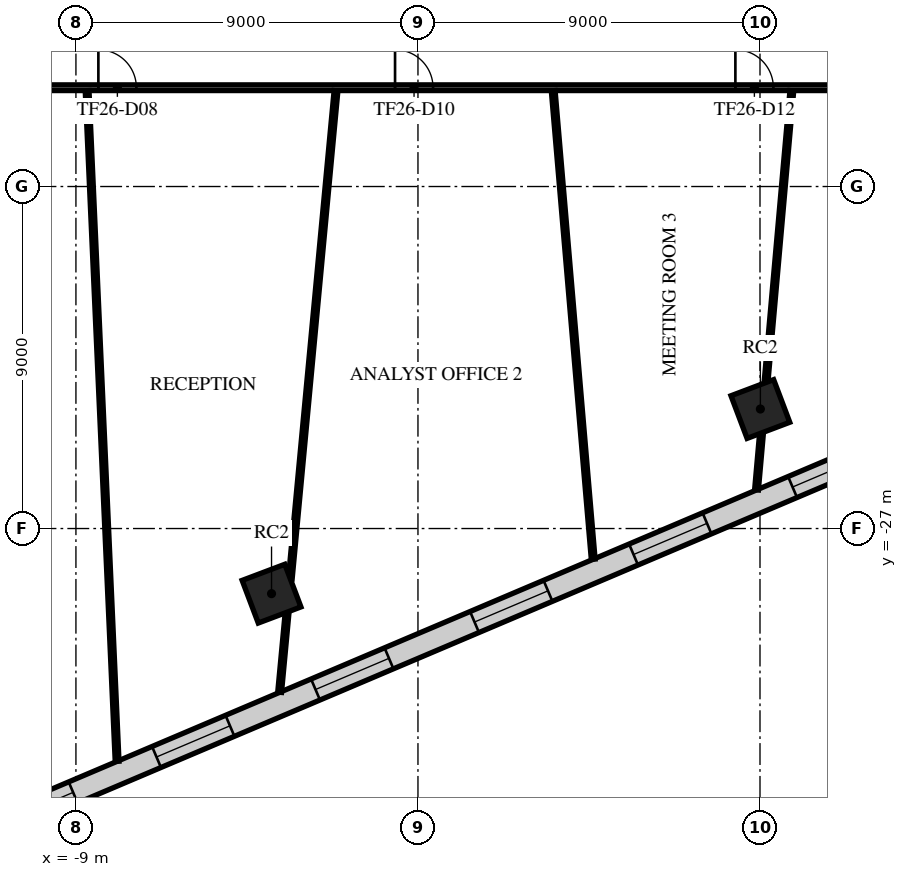
"""IFC4 building model, lengths in metres.
Left out: names, types, materials, properties, quantities, classifications, styles, units other than length and angle.
Written with IfcOpenShell. Run it as: python <this file> out.ifc"""

import sys

from ifc_helpers import new_model, si_unit, direction, frame, frame_2d, origin, origin_2d, place, context, subcontext, project, spatial, rectangle, extrude, element, fill, save


model = new_model("IFC4")
c1 = context("Model", 3, precision=1e-05, world=origin(), true_north=direction((0.0, 1.0)))
c2 = subcontext(c1, "Body", "Model", "MODEL_VIEW")
j1 = project(units=[si_unit("LENGTHUNIT", "METRE"), si_unit("PLANEANGLEUNIT", "RADIAN")], contexts=[c1])
p1 = place(None, origin())
s1 = spatial("IfcSite", under=j1, at=p1, CompositionType="ELEMENT")
p2 = place(p1, origin())
s2 = spatial("IfcBuilding", under=s1, at=p2, CompositionType="ELEMENT")
p3 = place(p2, frame((0.0, 0.0, 114.1)))
s3 = spatial("IfcBuildingStorey", under=s2, at=p3, CompositionType="ELEMENT", Elevation=114.1)
for number, where, z_axis, x_axis in (
    (1, (-3.853, -28.714, 0.0), (0.0, 0.0, 1.0), (0.935, 0.353, 0.0)),
    (2, (9.01, -23.855, 0.0), (0.0, 0.0, 1.0), (0.935, 0.353, 0.0)),
):
    element("IfcColumn", number, at=place(p3, frame(where, z_axis=z_axis, x_axis=x_axis)), inside=s3, PredefinedType="COLUMN", context=c2, shape_type="SweptSolid", body=[
        extrude(rectangle(XDim=1.2, YDim=1.2, at=origin_2d()), origin(), (0.0, 0.0, 1.0), 4.0),
    ])
p4 = place(p3, frame((-12.075, -35.218, 0.0), z_axis=(0.0, 0.0, 1.0), x_axis=(0.920504562186, 0.39073181467, 0.0)))
e3 = element("IfcWall", 3, at=p4, inside=s3, PredefinedType="STANDARD", context=c2, shape_type="SweptSolid", body=[
    extrude(rectangle(XDim=49.751, YDim=0.6, at=frame_2d((24.876, 0.0))), origin(), (0.0, 0.0, 1.0), 3.58),
])
p5 = place(p4, frame((1.161, 0.0, 0.9)))
e4 = element("IfcOpeningElement", 4, at=p5, cuts=e3, PredefinedType="OPENING", context=c2, shape_type="SweptSolid", body=[
    extrude(rectangle(XDim=2.1, YDim=2.1, at=frame_2d((1.05, 1.05))), frame((0.0, 0.31, 0.0), z_axis=(0.0, -1.0, 0.0), x_axis=(1.0, 0.0, 0.0)), (0.0, 0.0, 1.0), 0.62),
])
p6 = place(p4, frame((5.644, 0.0, 0.9)))
e5 = element("IfcOpeningElement", 5, at=p6, cuts=e3, PredefinedType="OPENING", context=c2, shape_type="SweptSolid", body=[
    extrude(rectangle(XDim=2.1, YDim=2.1, at=frame_2d((1.05, 1.05))), frame((0.0, 0.31, 0.0), z_axis=(0.0, -1.0, 0.0), x_axis=(1.0, 0.0, 0.0)), (0.0, 0.0, 1.0), 0.62),
])
p7 = place(p4, frame((10.189, 0.0, 0.9)))
e6 = element("IfcOpeningElement", 6, at=p7, cuts=e3, PredefinedType="OPENING", context=c2, shape_type="SweptSolid", body=[
    extrude(rectangle(XDim=2.1, YDim=2.1, at=frame_2d((1.05, 1.05))), frame((0.0, 0.31, 0.0), z_axis=(0.0, -1.0, 0.0), x_axis=(1.0, 0.0, 0.0)), (0.0, 0.0, 1.0), 0.62),
])
p8 = place(p4, frame((14.735, 0.0, 0.9)))
e7 = element("IfcOpeningElement", 7, at=p8, cuts=e3, PredefinedType="OPENING", context=c2, shape_type="SweptSolid", body=[
    extrude(rectangle(XDim=2.1, YDim=2.1, at=frame_2d((1.05, 1.05))), frame((0.0, 0.31, 0.0), z_axis=(0.0, -1.0, 0.0), x_axis=(1.0, 0.0, 0.0)), (0.0, 0.0, 1.0), 0.62),
])
p9 = place(p4, frame((19.28, 0.0, 0.9)))
e8 = element("IfcOpeningElement", 8, at=p9, cuts=e3, PredefinedType="OPENING", context=c2, shape_type="SweptSolid", body=[
    extrude(rectangle(XDim=2.1, YDim=2.1, at=frame_2d((1.05, 1.05))), frame((0.0, 0.31, 0.0), z_axis=(0.0, -1.0, 0.0), x_axis=(1.0, 0.0, 0.0)), (0.0, 0.0, 1.0), 0.62),
])
p10 = place(p4, frame((23.826, 0.0, 0.9)))
e9 = element("IfcOpeningElement", 9, at=p10, cuts=e3, PredefinedType="OPENING", context=c2, shape_type="SweptSolid", body=[
    extrude(rectangle(XDim=2.1, YDim=2.1, at=frame_2d((1.05, 1.05))), frame((0.0, 0.31, 0.0), z_axis=(0.0, -1.0, 0.0), x_axis=(1.0, 0.0, 0.0)), (0.0, 0.0, 1.0), 0.62),
])
p11 = place(p4, frame((28.371, 0.0, 0.9)))
e10 = element("IfcOpeningElement", 10, at=p11, cuts=e3, PredefinedType="OPENING", context=c2, shape_type="SweptSolid", body=[
    extrude(rectangle(XDim=2.1, YDim=2.1, at=frame_2d((1.05, 1.05))), frame((0.0, 0.31, 0.0), z_axis=(0.0, -1.0, 0.0), x_axis=(1.0, 0.0, 0.0)), (0.0, 0.0, 1.0), 0.62),
])
p12 = place(p4, frame((32.917, 0.0, 0.9)))
e11 = element("IfcOpeningElement", 11, at=p12, cuts=e3, PredefinedType="OPENING", context=c2, shape_type="SweptSolid", body=[
    extrude(rectangle(XDim=2.1, YDim=2.1, at=frame_2d((1.05, 1.05))), frame((0.0, 0.31, 0.0), z_axis=(0.0, -1.0, 0.0), x_axis=(1.0, 0.0, 0.0)), (0.0, 0.0, 1.0), 0.62),
])
p13 = place(p4, frame((37.462, 0.0, 0.9)))
e12 = element("IfcOpeningElement", 12, at=p13, cuts=e3, PredefinedType="OPENING", context=c2, shape_type="SweptSolid", body=[
    extrude(rectangle(XDim=2.1, YDim=2.1, at=frame_2d((1.05, 1.05))), frame((0.0, 0.31, 0.0), z_axis=(0.0, -1.0, 0.0), x_axis=(1.0, 0.0, 0.0)), (0.0, 0.0, 1.0), 0.62),
])
p14 = place(p4, frame((42.008, 0.0, 0.9)))
e13 = element("IfcOpeningElement", 13, at=p14, cuts=e3, PredefinedType="OPENING", context=c2, shape_type="SweptSolid", body=[
    extrude(rectangle(XDim=2.1, YDim=2.1, at=frame_2d((1.05, 1.05))), frame((0.0, 0.31, 0.0), z_axis=(0.0, -1.0, 0.0), x_axis=(1.0, 0.0, 0.0)), (0.0, 0.0, 1.0), 0.62),
])
p15 = place(p4, frame((46.491, 0.0, 0.9)))
e14 = element("IfcOpeningElement", 14, at=p15, cuts=e3, PredefinedType="OPENING", context=c2, shape_type="SweptSolid", body=[
    extrude(rectangle(XDim=2.1, YDim=2.1, at=frame_2d((1.05, 1.05))), frame((0.0, 0.31, 0.0), z_axis=(0.0, -1.0, 0.0), x_axis=(1.0, 0.0, 0.0)), (0.0, 0.0, 1.0), 0.62),
])
p16 = place(p3, frame((-15.325, -15.4, 0.0), z_axis=(0.0, 0.0, 1.0), x_axis=(1.0, 0.0, 0.0)))
e15 = element("IfcWall", 15, at=p16, inside=s3, PredefinedType="PARTITIONING", context=c2, shape_type="SweptSolid", body=[
    extrude(rectangle(XDim=30.725, YDim=0.15, at=frame_2d((15.362, 0.0))), origin(), (0.0, 0.0, 1.0), 3.08),
])
p17 = place(p16, frame((3.05, 0.0, 0.0)))
e16 = element("IfcOpeningElement", 16, at=p17, cuts=e15, PredefinedType="OPENING", context=c2, shape_type="SweptSolid", body=[
    extrude(rectangle(XDim=1.0, YDim=2.1, at=frame_2d((0.5, 1.05))), frame((0.0, 0.085, 0.0), z_axis=(0.0, -1.0, 0.0), x_axis=(1.0, 0.0, 0.0)), (0.0, 0.0, 1.0), 0.17),
])
p18 = place(p16, frame((6.916, 0.0, 0.0)))
e17 = element("IfcOpeningElement", 17, at=p18, cuts=e15, PredefinedType="OPENING", context=c2, shape_type="SweptSolid", body=[
    extrude(rectangle(XDim=1.0, YDim=2.1, at=frame_2d((0.5, 1.05))), frame((0.0, 0.085, 0.0), z_axis=(0.0, -1.0, 0.0), x_axis=(1.0, 0.0, 0.0)), (0.0, 0.0, 1.0), 0.17),
])
p19 = place(p16, frame((14.722, 0.0, 0.0)))
e18 = element("IfcOpeningElement", 18, at=p19, cuts=e15, PredefinedType="OPENING", context=c2, shape_type="SweptSolid", body=[
    extrude(rectangle(XDim=1.0, YDim=2.1, at=frame_2d((0.5, 1.05))), frame((0.0, 0.085, 0.0), z_axis=(0.0, -1.0, 0.0), x_axis=(1.0, 0.0, 0.0)), (0.0, 0.0, 1.0), 0.17),
])
p20 = place(p16, frame((23.677, 0.0, 0.0)))
e19 = element("IfcOpeningElement", 19, at=p20, cuts=e15, PredefinedType="OPENING", context=c2, shape_type="SweptSolid", body=[
    extrude(rectangle(XDim=1.0, YDim=2.1, at=frame_2d((0.5, 1.05))), frame((0.0, 0.085, 0.0), z_axis=(0.0, -1.0, 0.0), x_axis=(1.0, 0.0, 0.0)), (0.0, 0.0, 1.0), 0.17),
])
p21 = place(p3, frame((-8.706, -15.477, 0.0), z_axis=(0.0, 0.0, 1.0), x_axis=(0.044654718462, -0.999002480537, 0.0)))
e20 = element("IfcWall", 20, at=p21, inside=s3, PredefinedType="PARTITIONING", context=c2, shape_type="SweptSolid", body=[
    extrude(rectangle(XDim=17.665, YDim=0.1, at=frame_2d((8.833, 0.0))), origin(), (0.0, 0.0, 1.0), 2.83),
])
p22 = place(p3, frame((-3.64, -31.309, 0.0), z_axis=(0.0, 0.0, 1.0), x_axis=(0.093362131985, 0.995632217393, 0.0)))
e21 = element("IfcWall", 21, at=p22, inside=s3, PredefinedType="PARTITIONING", context=c2, shape_type="SweptSolid", body=[
    extrude(rectangle(XDim=2.118, YDim=0.1, at=frame_2d((1.059, 0.0))), origin(), (0.0, 0.0, 1.0), 3.58),
])
p23 = place(p3, frame((-3.36, -28.321, 0.0), z_axis=(0.0, 0.0, 1.0), x_axis=(0.093320771667, 0.995636094954, 0.0)))
e22 = element("IfcWall", 22, at=p23, inside=s3, PredefinedType="PARTITIONING", context=c2, shape_type="SweptSolid", body=[
    extrude(rectangle(XDim=12.898, YDim=0.1, at=frame_2d((6.449, 0.0))), origin(), (0.0, 0.0, 1.0), 2.83),
])
p24 = place(p3, frame((3.559, -15.479, 0.0), z_axis=(0.0, 0.0, 1.0), x_axis=(0.08504742067, -0.996376904709, 0.0)))
e23 = element("IfcWall", 23, at=p24, inside=s3, PredefinedType="PARTITIONING", context=c2, shape_type="SweptSolid", body=[
    extrude(rectangle(XDim=12.373, YDim=0.1, at=frame_2d((6.186, 0.0))), origin(), (0.0, 0.0, 1.0), 2.83),
])
p25 = place(p3, frame((8.908, -25.983, 0.0), z_axis=(0.0, 0.0, 1.0), x_axis=(0.088149646839, 0.996107243103, 0.0)))
e24 = element("IfcWall", 24, at=p25, inside=s3, PredefinedType="PARTITIONING", context=c2, shape_type="SweptSolid", body=[
    extrude(rectangle(XDim=1.504, YDim=0.1, at=frame_2d((0.752, 0.0))), origin(), (0.0, 0.0, 1.0), 3.58),
])
p26 = place(p3, frame((9.158, -23.158, 0.0), z_axis=(0.0, 0.0, 1.0), x_axis=(0.088176658473, 0.996104852363, 0.0)))
e25 = element("IfcWall", 25, at=p26, inside=s3, PredefinedType="PARTITIONING", context=c2, shape_type="SweptSolid", body=[
    extrude(rectangle(XDim=7.708, YDim=0.1, at=frame_2d((3.854, 0.0))), origin(), (0.0, 0.0, 1.0), 2.96),
])
p27 = place(p5, origin())
e26 = element("IfcWindow", 26, at=p27, inside=s3, PartitioningType="SINGLE_PANEL", PredefinedType="WINDOW", context=c2, shape_type="SweptSolid", body=[
    extrude(rectangle(XDim=2.1, YDim=2.1, at=frame_2d((1.05, 1.05))), frame((0.0, 0.03, 0.0), z_axis=(0.0, -1.0, 0.0), x_axis=(1.0, 0.0, 0.0)), (0.0, 0.0, 1.0), 0.06),
])
fill(e4, e26)
p28 = place(p6, origin())
e27 = element("IfcWindow", 27, at=p28, inside=s3, PartitioningType="SINGLE_PANEL", PredefinedType="WINDOW", context=c2, shape_type="SweptSolid", body=[
    extrude(rectangle(XDim=2.1, YDim=2.1, at=frame_2d((1.05, 1.05))), frame((0.0, 0.03, 0.0), z_axis=(0.0, -1.0, 0.0), x_axis=(1.0, 0.0, 0.0)), (0.0, 0.0, 1.0), 0.06),
])
fill(e5, e27)
p29 = place(p7, origin())
e28 = element("IfcWindow", 28, at=p29, inside=s3, PartitioningType="SINGLE_PANEL", PredefinedType="WINDOW", context=c2, shape_type="SweptSolid", body=[
    extrude(rectangle(XDim=2.1, YDim=2.1, at=frame_2d((1.05, 1.05))), frame((0.0, 0.03, 0.0), z_axis=(0.0, -1.0, 0.0), x_axis=(1.0, 0.0, 0.0)), (0.0, 0.0, 1.0), 0.06),
])
fill(e6, e28)
p30 = place(p8, origin())
e29 = element("IfcWindow", 29, at=p30, inside=s3, PartitioningType="SINGLE_PANEL", PredefinedType="WINDOW", context=c2, shape_type="SweptSolid", body=[
    extrude(rectangle(XDim=2.1, YDim=2.1, at=frame_2d((1.05, 1.05))), frame((0.0, 0.03, 0.0), z_axis=(0.0, -1.0, 0.0), x_axis=(1.0, 0.0, 0.0)), (0.0, 0.0, 1.0), 0.06),
])
fill(e7, e29)
p31 = place(p9, origin())
e30 = element("IfcWindow", 30, at=p31, inside=s3, PartitioningType="SINGLE_PANEL", PredefinedType="WINDOW", context=c2, shape_type="SweptSolid", body=[
    extrude(rectangle(XDim=2.1, YDim=2.1, at=frame_2d((1.05, 1.05))), frame((0.0, 0.03, 0.0), z_axis=(0.0, -1.0, 0.0), x_axis=(1.0, 0.0, 0.0)), (0.0, 0.0, 1.0), 0.06),
])
fill(e8, e30)
p32 = place(p10, origin())
e31 = element("IfcWindow", 31, at=p32, inside=s3, PartitioningType="SINGLE_PANEL", PredefinedType="WINDOW", context=c2, shape_type="SweptSolid", body=[
    extrude(rectangle(XDim=2.1, YDim=2.1, at=frame_2d((1.05, 1.05))), frame((0.0, 0.03, 0.0), z_axis=(0.0, -1.0, 0.0), x_axis=(1.0, 0.0, 0.0)), (0.0, 0.0, 1.0), 0.06),
])
fill(e9, e31)
p33 = place(p18, frame((1.0, 0.0, 0.0), z_axis=(0.0, 0.0, 1.0), x_axis=(-1.0, 0.0, 0.0)))
e32 = element("IfcDoor", 32, at=p33, inside=s3, OperationType="SINGLE_SWING_RIGHT", PredefinedType="DOOR", context=c2, shape_type="SweptSolid", body=[
    extrude(rectangle(XDim=1.0, YDim=2.1, at=frame_2d((0.5, 1.05))), frame((0.0, 0.025, 0.0), z_axis=(0.0, -1.0, 0.0), x_axis=(1.0, 0.0, 0.0)), (0.0, 0.0, 1.0), 0.05),
])
fill(e17, e32)
p34 = place(p19, frame((1.0, 0.0, 0.0), z_axis=(0.0, 0.0, 1.0), x_axis=(-1.0, 0.0, 0.0)))
e33 = element("IfcDoor", 33, at=p34, inside=s3, OperationType="SINGLE_SWING_RIGHT", PredefinedType="DOOR", context=c2, shape_type="SweptSolid", body=[
    extrude(rectangle(XDim=1.0, YDim=2.1, at=frame_2d((0.5, 1.05))), frame((0.0, 0.025, 0.0), z_axis=(0.0, -1.0, 0.0), x_axis=(1.0, 0.0, 0.0)), (0.0, 0.0, 1.0), 0.05),
])
fill(e18, e33)
p35 = place(p20, frame((1.0, 0.0, 0.0), z_axis=(0.0, 0.0, 1.0), x_axis=(-1.0, 0.0, 0.0)))
e34 = element("IfcDoor", 34, at=p35, inside=s3, OperationType="SINGLE_SWING_LEFT", PredefinedType="DOOR", context=c2, shape_type="SweptSolid", body=[
    extrude(rectangle(XDim=1.0, YDim=2.1, at=frame_2d((0.5, 1.05))), frame((0.0, 0.025, 0.0), z_axis=(0.0, -1.0, 0.0), x_axis=(1.0, 0.0, 0.0)), (0.0, 0.0, 1.0), 0.05),
])
fill(e19, e34)
save(model, sys.argv[1])
